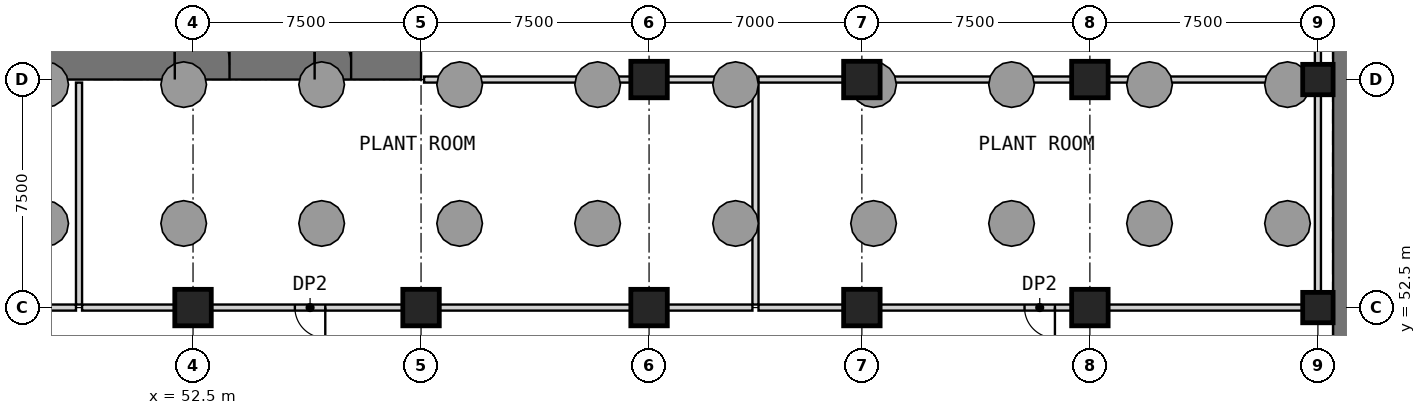
"""IFC4 building model, lengths in metres.
Left out: names, types, materials, properties, quantities, classifications, styles, units other than length and angle.
Written with IfcOpenShell. Run it as: python <this file> out.ifc"""

import sys

from ifc_helpers import new_model, si_unit, direction, frame, frame_2d, origin, origin_2d, place, context, subcontext, project, spatial, rectangle, extrude, element, fill, save


model = new_model("IFC4")
c1 = context("Model", 3, precision=1e-05, world=origin(), true_north=direction((0.0, 1.0)))
c2 = subcontext(c1, "Body", "Model", "MODEL_VIEW")
j1 = project(units=[si_unit("LENGTHUNIT", "METRE"), si_unit("PLANEANGLEUNIT", "RADIAN")], contexts=[c1])
p1 = place(None, origin())
s1 = spatial("IfcSite", under=j1, at=p1, CompositionType="ELEMENT")
p2 = place(p1, origin())
s2 = spatial("IfcBuilding", under=s1, at=p2, CompositionType="ELEMENT")
p3 = place(p2, frame((0.0, 0.0, -12.0)))
s3 = spatial("IfcBuildingStorey", under=s2, at=p3, CompositionType="ELEMENT", Elevation=-12.0)
p4 = place(p3, frame((90.5, 25.0, 0.0), z_axis=(0.0, 0.0, 1.0), x_axis=(0.0, 1.0, 0.0)))
e1 = element("IfcWall", 1, at=p4, inside=s3, PredefinedType="SHEAR", context=c2, shape_type="SweptSolid", body=[
    extrude(rectangle(XDim=92.5, YDim=1.0, at=frame_2d((46.25, 0.0))), origin(), (0.0, 0.0, 1.0), 5.4),
])
p5 = place(p4, frame((23.15, 0.0, 0.0)))
e2 = element("IfcOpeningElement", 2, at=p5, cuts=e1, PredefinedType="OPENING", context=c2, shape_type="SweptSolid", body=[
    extrude(rectangle(XDim=1.5, YDim=2.1, at=frame_2d((0.75, 1.05))), frame((0.0, 0.51, 0.0), z_axis=(0.0, -1.0, 0.0), x_axis=(1.0, 0.0, 0.0)), (0.0, 0.0, 1.0), 1.02),
])
p6 = place(p4, frame((67.75, 0.0, 0.0)))
e3 = element("IfcOpeningElement", 3, at=p6, cuts=e1, PredefinedType="OPENING", context=c2, shape_type="SweptSolid", body=[
    extrude(rectangle(XDim=1.5, YDim=2.1, at=frame_2d((0.75, 1.05))), frame((0.0, 0.51, 0.0), z_axis=(0.0, -1.0, 0.0), x_axis=(1.0, 0.0, 0.0)), (0.0, 0.0, 1.0), 1.02),
])
for number, where, z_axis, x_axis in (
    (4, (52.5, 52.5, 0.0), (0.0, 0.0, 1.0), (1.0, 0.0, 0.0)),
    (5, (60.0, 52.5, 0.0), (0.0, 0.0, 1.0), (1.0, 0.0, 0.0)),
    (6, (67.5, 52.5, 0.0), (0.0, 0.0, 1.0), (1.0, 0.0, 0.0)),
    (7, (67.5, 60.0, 0.0), (0.0, 0.0, 1.0), (1.0, 0.0, 0.0)),
    (8, (74.5, 52.5, 0.0), (0.0, 0.0, 1.0), (1.0, 0.0, 0.0)),
    (9, (74.5, 60.0, 0.0), (0.0, 0.0, 1.0), (1.0, 0.0, 0.0)),
    (10, (82.0, 52.5, 0.0), (0.0, 0.0, 1.0), (1.0, 0.0, 0.0)),
    (11, (82.0, 60.0, 0.0), (0.0, 0.0, 1.0), (1.0, 0.0, 0.0)),
):
    element("IfcColumn", number, at=place(p3, frame(where, z_axis=z_axis, x_axis=x_axis)), inside=s3, PredefinedType="COLUMN", context=c2, shape_type="SweptSolid", body=[
        extrude(rectangle(XDim=1.2, YDim=1.2, at=origin_2d()), origin(), (0.0, 0.0, 1.0), 6.0),
    ])
for number, where, z_axis, x_axis in (
    (12, (89.5, 52.5, 0.0), (0.0, 0.0, 1.0), (1.0, 0.0, 0.0)),
    (13, (89.5, 60.0, 0.0), (0.0, 0.0, 1.0), (1.0, 0.0, 0.0)),
):
    element("IfcColumn", number, at=place(p3, frame(where, z_axis=z_axis, x_axis=x_axis)), inside=s3, PredefinedType="COLUMN", context=c2, shape_type="SweptSolid", body=[
        extrude(rectangle(XDim=1.0, YDim=1.0, at=origin_2d()), origin(), (0.0, 0.0, 1.0), 6.0),
    ])
p7 = place(p3, frame((30.0, 60.5, 0.0), z_axis=(0.0, 0.0, 1.0), x_axis=(1.0, 0.0, 0.0)))
e14 = element("IfcWall", 14, at=p7, inside=s3, PredefinedType="SHEAR", context=c2, shape_type="SweptSolid", body=[
    extrude(rectangle(XDim=30.0, YDim=1.0, at=frame_2d((15.0, 0.0))), origin(), (0.0, 0.0, 1.0), 6.0),
])
p8 = place(p7, frame((21.9, 0.0, 0.0)))
e15 = element("IfcOpeningElement", 15, at=p8, cuts=e14, PredefinedType="OPENING", context=c2, shape_type="SweptSolid", body=[
    extrude(rectangle(XDim=1.8, YDim=2.1, at=frame_2d((0.9, 1.05))), frame((0.0, 0.51, 0.0), z_axis=(0.0, -1.0, 0.0), x_axis=(1.0, 0.0, 0.0)), (0.0, 0.0, 1.0), 1.02),
])
p9 = place(p7, frame((26.5, 0.0, 0.0)))
e16 = element("IfcOpeningElement", 16, at=p9, cuts=e14, PredefinedType="OPENING", context=c2, shape_type="SweptSolid", body=[
    extrude(rectangle(XDim=1.2, YDim=2.1, at=frame_2d((0.6, 1.05))), frame((0.0, 0.51, 0.0), z_axis=(0.0, -1.0, 0.0), x_axis=(1.0, 0.0, 0.0)), (0.0, 0.0, 1.0), 1.02),
])
for number, where, z_axis, x_axis in (
    (17, (45.6, 52.5, 0.0), (0.0, 0.0, 1.0), (1.0, 0.0, 0.0)),
    (18, (48.85, 52.5, 0.0), (0.0, 0.0, 1.0), (1.0, 0.0, 0.0)),
):
    element("IfcWall", number, at=place(p3, frame(where, z_axis=z_axis, x_axis=x_axis)), inside=s3, PredefinedType="PARTITIONING", context=c2, shape_type="SweptSolid", body=[
        extrude(rectangle(XDim=3.05, YDim=0.2, at=frame_2d((1.525, 0.0))), origin(), (0.0, 0.0, 1.0), 5.4),
    ])
p10 = place(p3, frame((59.4, 52.5, 0.0), z_axis=(0.0, 0.0, 1.0), x_axis=(-1.0, 0.0, 0.0)))
e19 = element("IfcWall", 19, at=p10, inside=s3, PredefinedType="PARTITIONING", context=c2, shape_type="SweptSolid", body=[
    extrude(rectangle(XDim=6.3, YDim=0.2, at=frame_2d((3.15, 0.0))), origin(), (0.0, 0.0, 1.0), 5.4),
])
p11 = place(p10, frame((2.55, 0.0, 0.0)))
e20 = element("IfcOpeningElement", 20, at=p11, cuts=e19, PredefinedType="OPENING", context=c2, shape_type="SweptSolid", body=[
    extrude(rectangle(XDim=1.0, YDim=2.1, at=frame_2d((0.5, 1.05))), frame((0.0, 0.11, 0.0), z_axis=(0.0, -1.0, 0.0), x_axis=(1.0, 0.0, 0.0)), (0.0, 0.0, 1.0), 0.22),
])
p12 = place(p3, frame((60.6, 52.5, 0.0), z_axis=(0.0, 0.0, 1.0), x_axis=(1.0, 0.0, 0.0)))
e21 = element("IfcWall", 21, at=p12, inside=s3, PredefinedType="PARTITIONING", context=c2, shape_type="SweptSolid", body=[
    extrude(rectangle(XDim=6.3, YDim=0.2, at=frame_2d((3.15, 0.0))), origin(), (0.0, 0.0, 1.0), 5.4),
])
for number, where, z_axis, x_axis in (
    (22, (68.1, 52.5, 0.0), (0.0, 0.0, 1.0), (1.0, 0.0, 0.0)),
    (23, (71.1, 52.5, 0.0), (0.0, 0.0, 1.0), (1.0, 0.0, 0.0)),
):
    element("IfcWall", number, at=place(p3, frame(where, z_axis=z_axis, x_axis=x_axis)), inside=s3, PredefinedType="PARTITIONING", context=c2, shape_type="SweptSolid", body=[
        extrude(rectangle(XDim=2.8, YDim=0.2, at=frame_2d((1.4, 0.0))), origin(), (0.0, 0.0, 1.0), 5.4),
    ])
p13 = place(p3, frame((81.4, 52.5, 0.0), z_axis=(0.0, 0.0, 1.0), x_axis=(-1.0, 0.0, 0.0)))
e24 = element("IfcWall", 24, at=p13, inside=s3, PredefinedType="PARTITIONING", context=c2, shape_type="SweptSolid", body=[
    extrude(rectangle(XDim=6.3, YDim=0.2, at=frame_2d((3.15, 0.0))), origin(), (0.0, 0.0, 1.0), 5.4),
])
p14 = place(p13, frame((0.55, 0.0, 0.0)))
e25 = element("IfcOpeningElement", 25, at=p14, cuts=e24, PredefinedType="OPENING", context=c2, shape_type="SweptSolid", body=[
    extrude(rectangle(XDim=1.0, YDim=2.1, at=frame_2d((0.5, 1.05))), frame((0.0, 0.11, 0.0), z_axis=(0.0, -1.0, 0.0), x_axis=(1.0, 0.0, 0.0)), (0.0, 0.0, 1.0), 0.22),
])
p15 = place(p3, frame((82.6, 52.5, 0.0), z_axis=(0.0, 0.0, 1.0), x_axis=(1.0, 0.0, 0.0)))
e26 = element("IfcWall", 26, at=p15, inside=s3, PredefinedType="PARTITIONING", context=c2, shape_type="SweptSolid", body=[
    extrude(rectangle(XDim=6.4, YDim=0.2, at=frame_2d((3.2, 0.0))), origin(), (0.0, 0.0, 1.0), 5.4),
])
p16 = place(p3, frame((60.1, 60.0, 0.0), z_axis=(0.0, 0.0, 1.0), x_axis=(1.0, 0.0, 0.0)))
e27 = element("IfcWall", 27, at=p16, inside=s3, PredefinedType="PARTITIONING", context=c2, shape_type="SweptSolid", body=[
    extrude(rectangle(XDim=6.8, YDim=0.2, at=frame_2d((3.4, 0.0))), origin(), (0.0, 0.0, 1.0), 5.4),
])
for number, where, z_axis, x_axis in (
    (28, (68.1, 60.0, 0.0), (0.0, 0.0, 1.0), (1.0, 0.0, 0.0)),
    (29, (71.1, 60.0, 0.0), (0.0, 0.0, 1.0), (1.0, 0.0, 0.0)),
):
    element("IfcWall", number, at=place(p3, frame(where, z_axis=z_axis, x_axis=x_axis)), inside=s3, PredefinedType="PARTITIONING", context=c2, shape_type="SweptSolid", body=[
        extrude(rectangle(XDim=2.8, YDim=0.2, at=frame_2d((1.4, 0.0))), origin(), (0.0, 0.0, 1.0), 5.4),
    ])
p17 = place(p3, frame((75.1, 60.0, 0.0), z_axis=(0.0, 0.0, 1.0), x_axis=(1.0, 0.0, 0.0)))
e30 = element("IfcWall", 30, at=p17, inside=s3, PredefinedType="PARTITIONING", context=c2, shape_type="SweptSolid", body=[
    extrude(rectangle(XDim=6.3, YDim=0.2, at=frame_2d((3.15, 0.0))), origin(), (0.0, 0.0, 1.0), 5.4),
])
p18 = place(p3, frame((82.6, 60.0, 0.0), z_axis=(0.0, 0.0, 1.0), x_axis=(1.0, 0.0, 0.0)))
e31 = element("IfcWall", 31, at=p18, inside=s3, PredefinedType="PARTITIONING", context=c2, shape_type="SweptSolid", body=[
    extrude(rectangle(XDim=6.4, YDim=0.2, at=frame_2d((3.2, 0.0))), origin(), (0.0, 0.0, 1.0), 5.4),
])
for number, where, z_axis, x_axis in (
    (32, (89.5, 53.0, 0.0), (0.0, 0.0, 1.0), (0.0, 1.0, 0.0)),
    (33, (89.5, 60.5, 0.0), (0.0, 0.0, 1.0), (0.0, 1.0, 0.0)),
):
    element("IfcWall", number, at=place(p3, frame(where, z_axis=z_axis, x_axis=x_axis)), inside=s3, PredefinedType="PARTITIONING", context=c2, shape_type="SweptSolid", body=[
        extrude(rectangle(XDim=6.5, YDim=0.2, at=frame_2d((3.25, 0.0))), origin(), (0.0, 0.0, 1.0), 5.4),
    ])
for number, where, z_axis, x_axis in (
    (34, (48.75, 52.6, 0.0), (0.0, 0.0, 1.0), (0.0, 1.0, 0.0)),
    (35, (71.0, 52.6, 0.0), (0.0, 0.0, 1.0), (0.0, 1.0, 0.0)),
):
    element("IfcWall", number, at=place(p3, frame(where, z_axis=z_axis, x_axis=x_axis)), inside=s3, PredefinedType="PARTITIONING", context=c2, shape_type="SweptSolid", body=[
        extrude(rectangle(XDim=7.3, YDim=0.2, at=frame_2d((3.65, 0.0))), origin(), (0.0, 0.0, 1.0), 5.4),
    ])
p19 = place(p8, origin())
e36 = element("IfcDoor", 36, at=p19, inside=s3, OperationType="DOUBLE_DOOR_SINGLE_SWING", PredefinedType="DOOR", context=c2, shape_type="SweptSolid", body=[
    extrude(rectangle(XDim=1.8, YDim=2.1, at=frame_2d((0.9, 1.05))), frame((0.0, 0.025, 0.0), z_axis=(0.0, -1.0, 0.0), x_axis=(1.0, 0.0, 0.0)), (0.0, 0.0, 1.0), 0.05),
])
fill(e15, e36)
p20 = place(p9, origin())
e37 = element("IfcDoor", 37, at=p20, inside=s3, OperationType="SINGLE_SWING_LEFT", PredefinedType="DOOR", context=c2, shape_type="SweptSolid", body=[
    extrude(rectangle(XDim=1.2, YDim=2.1, at=frame_2d((0.6, 1.05))), frame((0.0, 0.025, 0.0), z_axis=(0.0, -1.0, 0.0), x_axis=(1.0, 0.0, 0.0)), (0.0, 0.0, 1.0), 0.05),
])
fill(e16, e37)
p21 = place(p11, origin())
e38 = element("IfcDoor", 38, at=p21, inside=s3, OperationType="SINGLE_SWING_LEFT", PredefinedType="DOOR", context=c2, shape_type="SweptSolid", body=[
    extrude(rectangle(XDim=1.0, YDim=2.1, at=frame_2d((0.5, 1.05))), frame((0.0, 0.025, 0.0), z_axis=(0.0, -1.0, 0.0), x_axis=(1.0, 0.0, 0.0)), (0.0, 0.0, 1.0), 0.05),
])
fill(e20, e38)
p22 = place(p14, origin())
e39 = element("IfcDoor", 39, at=p22, inside=s3, OperationType="SINGLE_SWING_LEFT", PredefinedType="DOOR", context=c2, shape_type="SweptSolid", body=[
    extrude(rectangle(XDim=1.0, YDim=2.1, at=frame_2d((0.5, 1.05))), frame((0.0, 0.025, 0.0), z_axis=(0.0, -1.0, 0.0), x_axis=(1.0, 0.0, 0.0)), (0.0, 0.0, 1.0), 0.05),
])
fill(e25, e39)
save(model, sys.argv[1])
